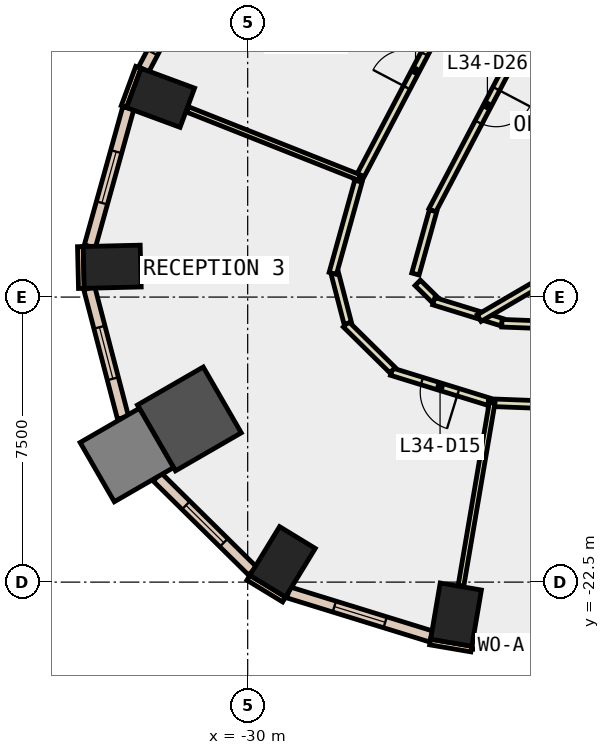
"""IFC4 building model, lengths in metres.
Left out: names, types, materials, properties, quantities, classifications, styles, units other than length and angle.
Written with IfcOpenShell. Run it as: python <this file> out.ifc"""

import sys

from ifc_helpers import new_model, si_unit, direction, frame, frame_2d, origin, origin_2d, place, context, subcontext, project, spatial, rectangle, extrude, element, fill, save


model = new_model("IFC4")
c1 = context("Model", 3, precision=1e-05, world=origin(), true_north=direction((0.0, 1.0)))
c2 = subcontext(c1, "Body", "Model", "MODEL_VIEW")
j1 = project(units=[si_unit("LENGTHUNIT", "METRE"), si_unit("PLANEANGLEUNIT", "RADIAN")], contexts=[c1])
p1 = place(None, origin())
s1 = spatial("IfcSite", under=j1, at=p1, CompositionType="ELEMENT")
p2 = place(p1, origin())
s2 = spatial("IfcBuilding", under=s1, at=p2, CompositionType="ELEMENT")
p3 = place(p2, frame((0.0, 0.0, 155.0)))
s3 = spatial("IfcBuildingStorey", under=s2, at=p3, CompositionType="ELEMENT", Elevation=155.0)
for number, where, z_axis, x_axis in (
    (1, (-24.518, -23.355, -0.4), (0.0, 0.0, 1.0), (-0.986, 0.168, 0.0)),
    (2, (-32.292, -9.758, -0.4), (0.0, 0.0, 1.0), (0.347, 0.938, 0.0)),
    (3, (-33.565, -14.202, -0.4), (0.0, 0.0, 1.0), (-0.024, 1.0, 0.0)),
):
    element("IfcColumn", number, at=place(p3, frame(where, z_axis=z_axis, x_axis=x_axis)), inside=s3, PredefinedType="COLUMN", context=c2, shape_type="SweptSolid", body=[
        extrude(rectangle(XDim=1.1, YDim=1.5, at=origin_2d()), origin(), (0.0, 0.0, 1.0), 4.2),
    ])
p4 = place(p3, frame((-31.535, -18.206, -0.4), z_axis=(0.0, 0.0, 1.0), x_axis=(0.866025403784, 0.5, 0.0)))
e4 = element("IfcColumn", 4, at=p4, inside=s3, PredefinedType="COLUMN", context=c2, shape_type="SweptSolid", body=[
    extrude(rectangle(XDim=2.0, YDim=2.0, at=origin_2d()), origin(), (0.0, 0.0, 1.0), 4.2),
])
p5 = place(p3, frame((-29.082, -21.967, -0.4), z_axis=(0.0, 0.0, 1.0), x_axis=(-0.853714435155, 0.520741455243, 0.0)))
e5 = element("IfcColumn", 5, at=p5, inside=s3, PredefinedType="COLUMN", context=c2, shape_type="SweptSolid", body=[
    extrude(rectangle(XDim=1.1, YDim=1.5, at=origin_2d()), origin(), (0.0, 0.0, 1.0), 4.2),
])
p6 = place(p3, frame((-33.18, -19.156, -0.4), z_axis=(0.0, 0.0, 1.0), x_axis=(0.866025403784, 0.5, 0.0)))
e6 = element("IfcColumn", 6, at=p6, inside=s3, PredefinedType="COLUMN", context=c2, shape_type="SweptSolid", body=[
    extrude(rectangle(XDim=1.8, YDim=1.8, at=origin_2d()), origin(), (0.0, 0.0, 1.0), 4.2),
])
p7 = place(p3, frame((-32.875, -8.956, 0.0), z_axis=(0.0, 0.0, 1.0), x_axis=(-0.346425160624, -0.93807761304, 0.0)))
e7 = element("IfcWall", 7, at=p7, inside=s3, PredefinedType="STANDARD", context=c2, shape_type="SweptSolid", body=[
    extrude(rectangle(XDim=1.1, YDim=0.15, at=frame_2d((0.55, 0.0))), origin(), (0.0, 0.0, 1.0), 3.8),
])
p8 = place(p3, frame((-25.199, -24.076, 0.0), z_axis=(0.0, 0.0, 1.0), x_axis=(0.985763338892, -0.168138751323, 0.0)))
e8 = element("IfcWall", 8, at=p8, inside=s3, PredefinedType="STANDARD", context=c2, shape_type="SweptSolid", body=[
    extrude(rectangle(XDim=1.101, YDim=0.15, at=frame_2d((0.55, 0.0))), origin(), (0.0, 0.0, 1.0), 3.8),
])
p9 = place(p3, frame((-34.403, -13.672, 0.0), z_axis=(0.0, 0.0, 1.0), x_axis=(0.023744690764, -0.999718055084, 0.0)))
e9 = element("IfcWall", 9, at=p9, inside=s3, PredefinedType="STANDARD", context=c2, shape_type="SweptSolid", body=[
    extrude(rectangle(XDim=1.1, YDim=0.15, at=frame_2d((0.55, 0.0))), origin(), (0.0, 0.0, 1.0), 3.8),
])
p10 = place(p3, frame((-29.981, -22.385, 0.0), z_axis=(0.0, 0.0, 1.0), x_axis=(0.854005542721, -0.520263907071, 0.0)))
e10 = element("IfcWall", 10, at=p10, inside=s3, PredefinedType="STANDARD", context=c2, shape_type="SweptSolid", body=[
    extrude(rectangle(XDim=1.099, YDim=0.15, at=frame_2d((0.55, 0.0))), origin(), (0.0, 0.0, 1.0), 3.8),
])
p11 = place(p3, frame((-24.09, -24.114, 0.0), z_axis=(0.0, 0.0, 1.0), x_axis=(0.999262356942, -0.038402369711, 0.0)))
e11 = element("IfcWall", 11, at=p11, inside=s3, PredefinedType="STANDARD", context=c2, shape_type="SweptSolid", body=[
    extrude(rectangle(XDim=7.317, YDim=0.3, at=frame_2d((3.659, 0.0))), origin(), (0.0, 0.0, 1.0), 3.8),
])
p12 = place(p11, frame((0.629, 0.0, 0.9)))
e12 = element("IfcOpeningElement", 12, at=p12, cuts=e11, PredefinedType="OPENING", context=c2, shape_type="SweptSolid", body=[
    extrude(rectangle(XDim=2.4, YDim=2.6, at=frame_2d((1.2, 1.3))), frame((0.0, 0.16, 0.0), z_axis=(0.0, -1.0, 0.0), x_axis=(1.0, 0.0, 0.0)), (0.0, 0.0, 1.0), 0.32),
])
p13 = place(p11, frame((4.288, 0.0, 0.9)))
e13 = element("IfcOpeningElement", 13, at=p13, cuts=e11, PredefinedType="OPENING", context=c2, shape_type="SweptSolid", body=[
    extrude(rectangle(XDim=2.4, YDim=2.6, at=frame_2d((1.2, 1.3))), frame((0.0, 0.16, 0.0), z_axis=(0.0, -1.0, 0.0), x_axis=(1.0, 0.0, 0.0)), (0.0, 0.0, 1.0), 0.32),
])
p14 = place(p3, frame((-29.951, -3.705, 0.0), z_axis=(0.0, 0.0, 1.0), x_axis=(-0.465104650407, -0.885255705528, 0.0)))
e14 = element("IfcWall", 14, at=p14, inside=s3, PredefinedType="STANDARD", context=c2, shape_type="SweptSolid", body=[
    extrude(rectangle(XDim=5.99, YDim=0.3, at=frame_2d((2.995, 0.0))), origin(), (0.0, 0.0, 1.0), 3.8),
])
p15 = place(p14, frame((0.498, 0.0, 0.9)))
e15 = element("IfcOpeningElement", 15, at=p15, cuts=e14, PredefinedType="OPENING", context=c2, shape_type="SweptSolid", body=[
    extrude(rectangle(XDim=2.0, YDim=2.6, at=frame_2d((1.0, 1.3))), frame((0.0, 0.16, 0.0), z_axis=(0.0, -1.0, 0.0), x_axis=(1.0, 0.0, 0.0)), (0.0, 0.0, 1.0), 0.32),
])
p16 = place(p14, frame((3.493, 0.0, 0.9)))
e16 = element("IfcOpeningElement", 16, at=p16, cuts=e14, PredefinedType="OPENING", context=c2, shape_type="SweptSolid", body=[
    extrude(rectangle(XDim=2.0, YDim=2.6, at=frame_2d((1.0, 1.3))), frame((0.0, 0.16, 0.0), z_axis=(0.0, -1.0, 0.0), x_axis=(1.0, 0.0, 0.0)), (0.0, 0.0, 1.0), 0.32),
])
p17 = place(p3, frame((-33.142, -10.029, 0.0), z_axis=(0.0, 0.0, 1.0), x_axis=(-0.26799398221, -0.963420585985, 0.0)))
e17 = element("IfcWall", 17, at=p17, inside=s3, PredefinedType="STANDARD", context=c2, shape_type="SweptSolid", body=[
    extrude(rectangle(XDim=3.776, YDim=0.3, at=frame_2d((1.888, 0.0))), origin(), (0.0, 0.0, 1.0), 3.8),
])
p18 = place(p17, frame((1.188, 0.0, 0.9)))
e18 = element("IfcOpeningElement", 18, at=p18, cuts=e17, PredefinedType="OPENING", context=c2, shape_type="SweptSolid", body=[
    extrude(rectangle(XDim=1.4, YDim=2.6, at=frame_2d((0.7, 1.3))), frame((0.0, 0.16, 0.0), z_axis=(0.0, -1.0, 0.0), x_axis=(1.0, 0.0, 0.0)), (0.0, 0.0, 1.0), 0.32),
])
p19 = place(p3, frame((-34.169, -14.766, 0.0), z_axis=(0.0, 0.0, 1.0), x_axis=(0.252255494168, -0.967660666588, 0.0)))
e19 = element("IfcWall", 19, at=p19, inside=s3, PredefinedType="STANDARD", context=c2, shape_type="SweptSolid", body=[
    extrude(rectangle(XDim=3.524, YDim=0.3, at=frame_2d((1.762, 0.0))), origin(), (0.0, 0.0, 1.0), 3.8),
])
p20 = place(p19, frame((1.062, 0.0, 0.9)))
e20 = element("IfcOpeningElement", 20, at=p20, cuts=e19, PredefinedType="OPENING", context=c2, shape_type="SweptSolid", body=[
    extrude(rectangle(XDim=1.4, YDim=2.6, at=frame_2d((0.7, 1.3))), frame((0.0, 0.16, 0.0), z_axis=(0.0, -1.0, 0.0), x_axis=(1.0, 0.0, 0.0)), (0.0, 0.0, 1.0), 0.32),
])
p21 = place(p3, frame((-32.381, -19.733, 0.0), z_axis=(0.0, 0.0, 1.0), x_axis=(0.712043314899, -0.702135540838, 0.0)))
e21 = element("IfcWall", 21, at=p21, inside=s3, PredefinedType="STANDARD", context=c2, shape_type="SweptSolid", body=[
    extrude(rectangle(XDim=3.524, YDim=0.3, at=frame_2d((1.762, 0.0))), origin(), (0.0, 0.0, 1.0), 3.8),
])
p22 = place(p21, frame((1.062, 0.0, 0.9)))
e22 = element("IfcOpeningElement", 22, at=p22, cuts=e21, PredefinedType="OPENING", context=c2, shape_type="SweptSolid", body=[
    extrude(rectangle(XDim=1.4, YDim=2.6, at=frame_2d((0.7, 1.3))), frame((0.0, 0.16, 0.0), z_axis=(0.0, -1.0, 0.0), x_axis=(1.0, 0.0, 0.0)), (0.0, 0.0, 1.0), 0.32),
])
p23 = place(p3, frame((-28.929, -22.77, 0.0), z_axis=(0.0, 0.0, 1.0), x_axis=(0.955473661147, -0.295076401723, 0.0)))
e23 = element("IfcWall", 23, at=p23, inside=s3, PredefinedType="STANDARD", context=c2, shape_type="SweptSolid", body=[
    extrude(rectangle(XDim=3.931, YDim=0.3, at=frame_2d((1.965, 0.0))), origin(), (0.0, 0.0, 1.0), 3.8),
])
p24 = place(p23, frame((1.266, 0.0, 0.9)))
e24 = element("IfcOpeningElement", 24, at=p24, cuts=e23, PredefinedType="OPENING", context=c2, shape_type="SweptSolid", body=[
    extrude(rectangle(XDim=1.4, YDim=2.6, at=frame_2d((0.7, 1.3))), frame((0.0, 0.16, 0.0), z_axis=(0.0, -1.0, 0.0), x_axis=(1.0, 0.0, 0.0)), (0.0, 0.0, 1.0), 0.32),
])
p25 = place(p3, frame((-22.241, -7.198, 0.0), z_axis=(0.0, 0.0, 1.0), x_axis=(-0.465089990515, -0.885263407536, 0.0)))
e25 = element("IfcWall", 25, at=p25, inside=s3, PredefinedType="PARTITIONING", context=c2, shape_type="SweptSolid", body=[
    extrude(rectangle(XDim=6.24, YDim=0.2, at=frame_2d((3.12, 0.0))), origin(), (0.0, 0.0, 1.0), 3.8),
])
p26 = place(p25, frame((2.62, 0.0, 0.0)))
e26 = element("IfcOpeningElement", 26, at=p26, cuts=e25, PredefinedType="OPENING", context=c2, shape_type="SweptSolid", body=[
    extrude(rectangle(XDim=1.0, YDim=2.1, at=frame_2d((0.5, 1.05))), frame((0.0, 0.11, 0.0), z_axis=(0.0, -1.0, 0.0), x_axis=(1.0, 0.0, 0.0)), (0.0, 0.0, 1.0), 0.22),
])
p27 = place(p3, frame((-25.123, -12.73, 0.0), z_axis=(0.0, 0.0, 1.0), x_axis=(-0.268139825244, -0.963380005044, 0.0)))
e27 = element("IfcWall", 27, at=p27, inside=s3, PredefinedType="PARTITIONING", context=c2, shape_type="SweptSolid", body=[
    extrude(rectangle(XDim=1.726, YDim=0.2, at=frame_2d((0.863, 0.0))), origin(), (0.0, 0.0, 1.0), 3.8),
])
p28 = place(p3, frame((-25.526, -14.626, 0.0), z_axis=(0.0, 0.0, 1.0), x_axis=(0.711758647644, -0.702424108003, 0.0)))
e28 = element("IfcWall", 28, at=p28, inside=s3, PredefinedType="PARTITIONING", context=c2, shape_type="SweptSolid", body=[
    extrude(rectangle(XDim=0.628, YDim=0.2, at=frame_2d((0.314, 0.0))), origin(), (0.0, 0.0, 1.0), 3.8),
])
p29 = place(p3, frame((-25.103, -15.108, 0.0), z_axis=(0.0, 0.0, 1.0), x_axis=(0.955420813731, -0.295247470251, 0.0)))
e29 = element("IfcWall", 29, at=p29, inside=s3, PredefinedType="PARTITIONING", context=c2, shape_type="SweptSolid", body=[
    extrude(rectangle(XDim=1.24, YDim=0.2, at=frame_2d((0.62, 0.0))), origin(), (0.0, 0.0, 1.0), 3.8),
])
p30 = place(p3, frame((-23.727, -15.532, 0.0), z_axis=(0.0, 0.0, 1.0), x_axis=(0.955237350621, -0.295840504289, 0.0)))
e30 = element("IfcWall", 30, at=p30, inside=s3, PredefinedType="PARTITIONING", context=c2, shape_type="SweptSolid", body=[
    extrude(rectangle(XDim=0.44, YDim=0.2, at=frame_2d((0.22, 0.0))), origin(), (0.0, 0.0, 1.0), 3.8),
])
p31 = place(p3, frame((-23.311, -15.688, 0.0), z_axis=(0.0, 0.0, 1.0), x_axis=(0.999262695969, -0.038393546916, 0.0)))
e31 = element("IfcWall", 31, at=p31, inside=s3, PredefinedType="PARTITIONING", context=c2, shape_type="SweptSolid", body=[
    extrude(rectangle(XDim=7.344, YDim=0.2, at=frame_2d((3.672, 0.0))), origin(), (0.0, 0.0, 1.0), 3.8),
])
p32 = place(p31, frame((3.172, 0.0, 0.0)))
e32 = element("IfcOpeningElement", 32, at=p32, cuts=e31, PredefinedType="OPENING", context=c2, shape_type="SweptSolid", body=[
    extrude(rectangle(XDim=1.0, YDim=2.1, at=frame_2d((0.5, 1.05))), frame((0.0, 0.11, 0.0), z_axis=(0.0, -1.0, 0.0), x_axis=(1.0, 0.0, 0.0)), (0.0, 0.0, 1.0), 0.22),
])
p33 = place(p3, frame((-27.106, -11.944, 0.0), z_axis=(0.0, 0.0, 1.0), x_axis=(0.464985599417, 0.885318243534, 0.0)))
e33 = element("IfcWall", 33, at=p33, inside=s3, PredefinedType="PARTITIONING", context=c2, shape_type="SweptSolid", body=[
    extrude(rectangle(XDim=6.402, YDim=0.2, at=frame_2d((3.201, 0.0))), origin(), (0.0, 0.0, 1.0), 3.8),
])
p34 = place(p33, frame((2.776, 0.0, 0.0)))
e34 = element("IfcOpeningElement", 34, at=p34, cuts=e33, PredefinedType="OPENING", context=c2, shape_type="SweptSolid", body=[
    extrude(rectangle(XDim=1.0, YDim=2.1, at=frame_2d((0.5, 1.05))), frame((0.0, 0.11, 0.0), z_axis=(0.0, -1.0, 0.0), x_axis=(1.0, 0.0, 0.0)), (0.0, 0.0, 1.0), 0.22),
])
p35 = place(p3, frame((-23.663, -17.75, 0.0), z_axis=(0.0, 0.0, 1.0), x_axis=(-0.955509582123, 0.294960062501, 0.0)))
e35 = element("IfcWall", 35, at=p35, inside=s3, PredefinedType="PARTITIONING", context=c2, shape_type="SweptSolid", body=[
    extrude(rectangle(XDim=2.668, YDim=0.2, at=frame_2d((1.334, 0.0))), origin(), (0.0, 0.0, 1.0), 3.8),
])
p36 = place(p35, frame((0.834, 0.0, 0.0)))
e36 = element("IfcOpeningElement", 36, at=p36, cuts=e35, PredefinedType="OPENING", context=c2, shape_type="SweptSolid", body=[
    extrude(rectangle(XDim=1.0, YDim=2.1, at=frame_2d((0.5, 1.05))), frame((0.0, 0.11, 0.0), z_axis=(0.0, -1.0, 0.0), x_axis=(1.0, 0.0, 0.0)), (0.0, 0.0, 1.0), 0.22),
])
p37 = place(p3, frame((-26.188, -16.922, 0.0), z_axis=(0.0, 0.0, 1.0), x_axis=(-0.712339678389, 0.701834868465, 0.0)))
e37 = element("IfcWall", 37, at=p37, inside=s3, PredefinedType="PARTITIONING", context=c2, shape_type="SweptSolid", body=[
    extrude(rectangle(XDim=1.72, YDim=0.2, at=frame_2d((0.86, 0.0))), origin(), (0.0, 0.0, 1.0), 3.8),
])
p38 = place(p3, frame((-27.367, -15.688, 0.0), z_axis=(0.0, 0.0, 1.0), x_axis=(-0.25159336549, 0.967833032316, 0.0)))
e38 = element("IfcWall", 38, at=p38, inside=s3, PredefinedType="PARTITIONING", context=c2, shape_type="SweptSolid", body=[
    extrude(rectangle(XDim=1.356, YDim=0.2, at=frame_2d((0.678, 0.0))), origin(), (0.0, 0.0, 1.0), 3.8),
])
p39 = place(p3, frame((-27.76, -14.376, 0.0), z_axis=(0.0, 0.0, 1.0), x_axis=(0.267909096687, 0.963444194498, 0.0)))
e39 = element("IfcWall", 39, at=p39, inside=s3, PredefinedType="PARTITIONING", context=c2, shape_type="SweptSolid", body=[
    extrude(rectangle(XDim=2.516, YDim=0.2, at=frame_2d((1.258, 0.0))), origin(), (0.0, 0.0, 1.0), 3.8),
])
p40 = place(p3, frame((-16.036, -18.069, 0.0), z_axis=(0.0, 0.0, 1.0), x_axis=(-0.999262637786, 0.038395061202, 0.0)))
e40 = element("IfcWall", 40, at=p40, inside=s3, PredefinedType="PARTITIONING", context=c2, shape_type="SweptSolid", body=[
    extrude(rectangle(XDim=7.637, YDim=0.2, at=frame_2d((3.818, 0.0))), origin(), (0.0, 0.0, 1.0), 3.8),
])
p41 = place(p40, frame((3.318, 0.0, 0.0)))
e41 = element("IfcOpeningElement", 41, at=p41, cuts=e40, PredefinedType="OPENING", context=c2, shape_type="SweptSolid", body=[
    extrude(rectangle(XDim=1.0, YDim=2.1, at=frame_2d((0.5, 1.05))), frame((0.0, 0.11, 0.0), z_axis=(0.0, -1.0, 0.0), x_axis=(1.0, 0.0, 0.0)), (0.0, 0.0, 1.0), 0.22),
])
p42 = place(p3, frame((-16.803, -11.397, 0.0), z_axis=(0.0, 0.0, 1.0), x_axis=(-0.863203941699, -0.504855380318, 0.0)))
e42 = element("IfcWall", 42, at=p42, inside=s3, PredefinedType="PARTITIONING", context=c2, shape_type="SweptSolid", body=[
    extrude(rectangle(XDim=8.232, YDim=0.2, at=frame_2d((4.116, 0.0))), origin(), (0.0, 0.0, 1.0), 3.8),
])
p43 = place(p3, frame((-27.059, -11.855, 0.0), z_axis=(0.0, 0.0, 1.0), x_axis=(-0.92964843089, 0.368447818481, 0.0)))
e43 = element("IfcWall", 43, at=p43, inside=s3, PredefinedType="PARTITIONING", context=c2, shape_type="SweptSolid", body=[
    extrude(rectangle(XDim=4.866, YDim=0.15, at=frame_2d((2.433, 0.0))), origin(), (0.0, 0.0, 1.0), 3.8),
])
p44 = place(p3, frame((-23.567, -17.779, 0.0), z_axis=(0.0, 0.0, 1.0), x_axis=(-0.168027663896, -0.985782280306, 0.0)))
e44 = element("IfcWall", 44, at=p44, inside=s3, PredefinedType="PARTITIONING", context=c2, shape_type="SweptSolid", body=[
    extrude(rectangle(XDim=4.886, YDim=0.15, at=frame_2d((2.443, 0.0))), origin(), (0.0, 0.0, 1.0), 3.8),
])
p45 = place(p12, origin())
e45 = element("IfcWindow", 45, at=p45, inside=s3, PartitioningType="SINGLE_PANEL", PredefinedType="WINDOW", context=c2, shape_type="SweptSolid", body=[
    extrude(rectangle(XDim=2.4, YDim=2.6, at=frame_2d((1.2, 1.3))), frame((0.0, 0.03, 0.0), z_axis=(0.0, -1.0, 0.0), x_axis=(1.0, 0.0, 0.0)), (0.0, 0.0, 1.0), 0.06),
])
fill(e12, e45)
p46 = place(p16, origin())
e46 = element("IfcWindow", 46, at=p46, inside=s3, PartitioningType="SINGLE_PANEL", PredefinedType="WINDOW", context=c2, shape_type="SweptSolid", body=[
    extrude(rectangle(XDim=2.0, YDim=2.6, at=frame_2d((1.0, 1.3))), frame((0.0, 0.03, 0.0), z_axis=(0.0, -1.0, 0.0), x_axis=(1.0, 0.0, 0.0)), (0.0, 0.0, 1.0), 0.06),
])
fill(e16, e46)
p47 = place(p18, origin())
e47 = element("IfcWindow", 47, at=p47, inside=s3, PartitioningType="SINGLE_PANEL", PredefinedType="WINDOW", context=c2, shape_type="SweptSolid", body=[
    extrude(rectangle(XDim=1.4, YDim=2.6, at=frame_2d((0.7, 1.3))), frame((0.0, 0.03, 0.0), z_axis=(0.0, -1.0, 0.0), x_axis=(1.0, 0.0, 0.0)), (0.0, 0.0, 1.0), 0.06),
])
fill(e18, e47)
p48 = place(p20, origin())
e48 = element("IfcWindow", 48, at=p48, inside=s3, PartitioningType="SINGLE_PANEL", PredefinedType="WINDOW", context=c2, shape_type="SweptSolid", body=[
    extrude(rectangle(XDim=1.4, YDim=2.6, at=frame_2d((0.7, 1.3))), frame((0.0, 0.03, 0.0), z_axis=(0.0, -1.0, 0.0), x_axis=(1.0, 0.0, 0.0)), (0.0, 0.0, 1.0), 0.06),
])
fill(e20, e48)
p49 = place(p22, origin())
e49 = element("IfcWindow", 49, at=p49, inside=s3, PartitioningType="SINGLE_PANEL", PredefinedType="WINDOW", context=c2, shape_type="SweptSolid", body=[
    extrude(rectangle(XDim=1.4, YDim=2.6, at=frame_2d((0.7, 1.3))), frame((0.0, 0.03, 0.0), z_axis=(0.0, -1.0, 0.0), x_axis=(1.0, 0.0, 0.0)), (0.0, 0.0, 1.0), 0.06),
])
fill(e22, e49)
p50 = place(p24, origin())
e50 = element("IfcWindow", 50, at=p50, inside=s3, PartitioningType="SINGLE_PANEL", PredefinedType="WINDOW", context=c2, shape_type="SweptSolid", body=[
    extrude(rectangle(XDim=1.4, YDim=2.6, at=frame_2d((0.7, 1.3))), frame((0.0, 0.03, 0.0), z_axis=(0.0, -1.0, 0.0), x_axis=(1.0, 0.0, 0.0)), (0.0, 0.0, 1.0), 0.06),
])
fill(e24, e50)
p51 = place(p34, origin())
e51 = element("IfcDoor", 51, at=p51, inside=s3, OperationType="SINGLE_SWING_LEFT", PredefinedType="DOOR", context=c2, shape_type="SweptSolid", body=[
    extrude(rectangle(XDim=1.0, YDim=2.1, at=frame_2d((0.5, 1.05))), frame((0.0, 0.025, 0.0), z_axis=(0.0, -1.0, 0.0), x_axis=(1.0, 0.0, 0.0)), (0.0, 0.0, 1.0), 0.05),
])
fill(e34, e51)
p52 = place(p36, origin())
e52 = element("IfcDoor", 52, at=p52, inside=s3, OperationType="SINGLE_SWING_LEFT", PredefinedType="DOOR", context=c2, shape_type="SweptSolid", body=[
    extrude(rectangle(XDim=1.0, YDim=2.1, at=frame_2d((0.5, 1.05))), frame((0.0, 0.025, 0.0), z_axis=(0.0, -1.0, 0.0), x_axis=(1.0, 0.0, 0.0)), (0.0, 0.0, 1.0), 0.05),
])
fill(e36, e52)
p53 = place(p26, origin())
e53 = element("IfcDoor", 53, at=p53, inside=s3, OperationType="SINGLE_SWING_LEFT", PredefinedType="DOOR", context=c2, shape_type="SweptSolid", body=[
    extrude(rectangle(XDim=1.0, YDim=2.1, at=frame_2d((0.5, 1.05))), frame((0.0, 0.025, 0.0), z_axis=(0.0, -1.0, 0.0), x_axis=(1.0, 0.0, 0.0)), (0.0, 0.0, 1.0), 0.05),
])
fill(e26, e53)
save(model, sys.argv[1])
